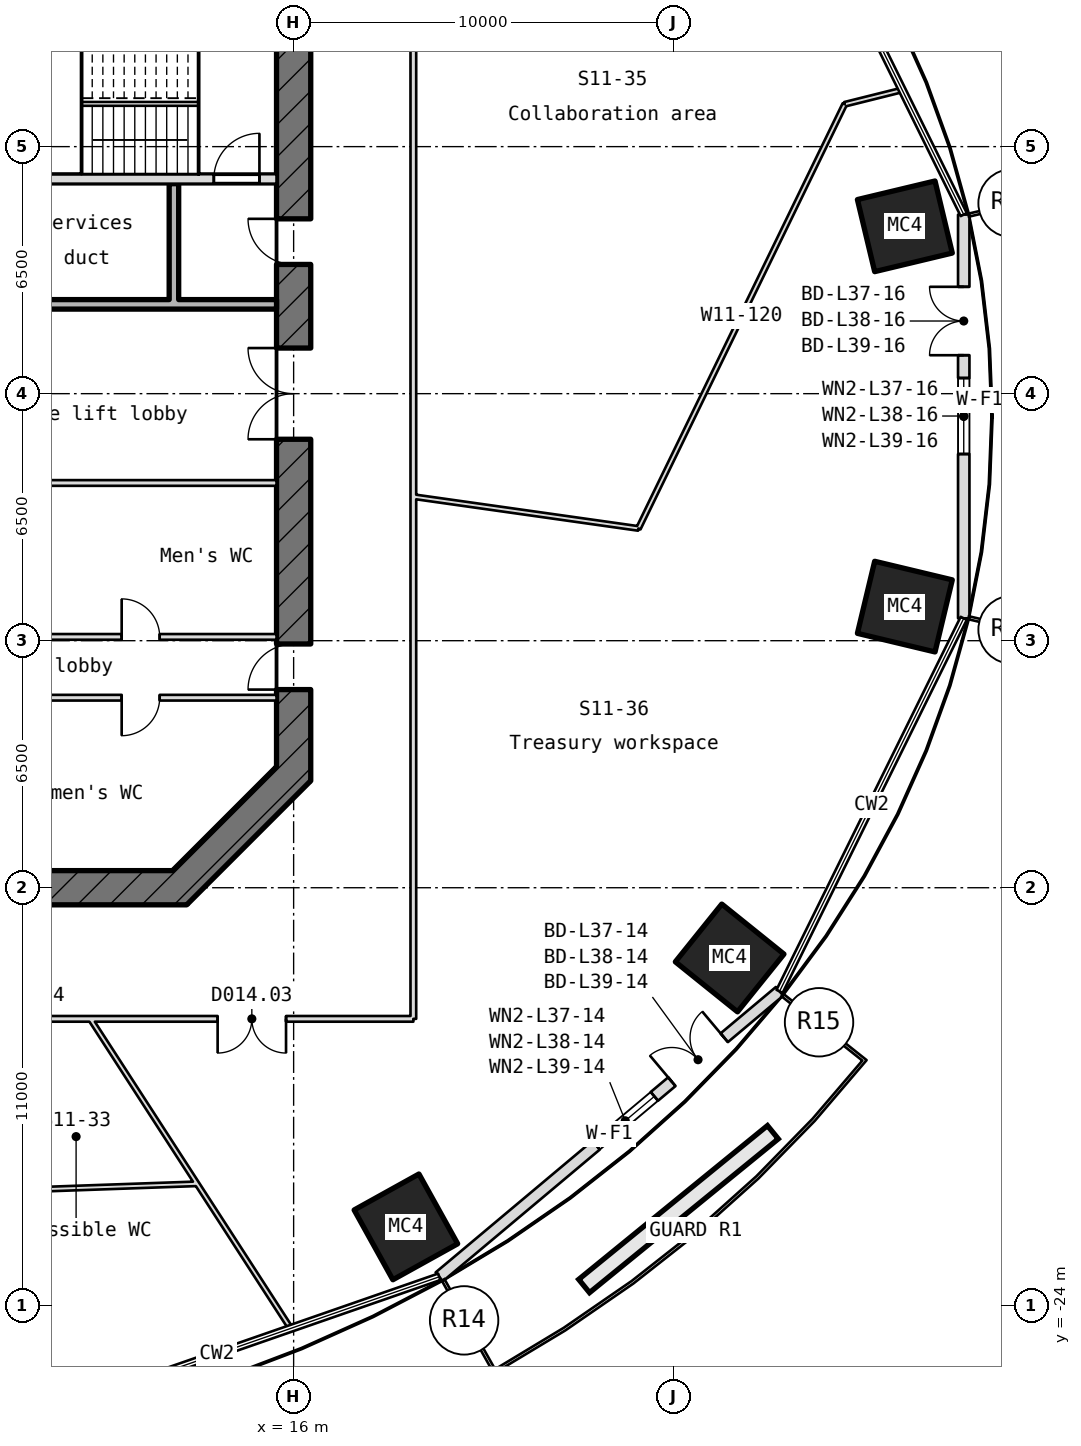
"""IFC4 building model, lengths in metres.
Left out: names, types, materials, properties, quantities, classifications, styles, units other than length and angle.
Written with IfcOpenShell. Run it as: python <this file> out.ifc"""

import sys

from ifc_helpers import new_model, si_unit, direction, frame, frame_2d, origin, origin_2d, place, context, subcontext, project, spatial, rectangle, hollow_rectangle, extrude, element, fill, save


model = new_model("IFC4")
c1 = context("Model", 3, precision=1e-05, world=origin(), true_north=direction((0.0, 1.0)))
c2 = subcontext(c1, "Body", "Model", "MODEL_VIEW")
j1 = project(units=[si_unit("LENGTHUNIT", "METRE"), si_unit("PLANEANGLEUNIT", "RADIAN")], contexts=[c1])
p1 = place(None, origin())
s1 = spatial("IfcSite", under=j1, at=p1, CompositionType="ELEMENT")
p2 = place(p1, origin())
s2 = spatial("IfcBuilding", under=s1, at=p2, CompositionType="ELEMENT")
p3 = place(p2, frame((0.0, 0.0, 173.5)))
s3 = spatial("IfcBuildingStorey", under=s2, at=p3, CompositionType="ELEMENT", Elevation=173.5)
for number, where, z_axis, x_axis in (
    (1, (32.084, 4.403, -0.18), (0.0, 0.0, 1.0), (0.233, -0.973, 0.0)),
    (2, (18.954, -21.924, -0.18), (0.0, 0.0, 1.0), (-0.874, -0.485, 0.0)),
    (3, (27.473, -14.848, -0.18), (0.0, 0.0, 1.0), (-0.627, -0.779, 0.0)),
    (4, (32.084, -5.603, -0.18), (0.0, 0.0, 1.0), (-0.233, -0.973, 0.0)),
):
    element("IfcColumn", number, at=place(p3, frame(where, z_axis=z_axis, x_axis=x_axis)), inside=s3, PredefinedType="COLUMN", context=c2, shape_type="SweptSolid", body=[
        extrude(hollow_rectangle(XDim=1.95, YDim=2.1, WallThickness=0.075, at=origin_2d()), origin(), (0.0, 0.0, 1.0), 4.15),
    ])
p4 = place(p3, frame((19.832, -23.238, 0.0), z_axis=(0.0, 0.0, 1.0), x_axis=(0.766159362154, 0.642650629645, 0.0)))
e5 = element("IfcWall", 5, at=p4, inside=s3, PredefinedType="SOLIDWALL", context=c2, shape_type="SweptSolid", body=[
    extrude(rectangle(XDim=11.688, YDim=0.3, at=frame_2d((5.844, 0.0))), origin(), (0.0, 0.0, 1.0), 3.97),
])
p5 = place(p4, frame((7.988, 0.0, 0.0)))
e6 = element("IfcOpeningElement", 6, at=p5, cuts=e5, PredefinedType="OPENING", context=c2, shape_type="SweptSolid", body=[
    extrude(rectangle(XDim=1.8, YDim=2.4, at=frame_2d((0.9, 1.2))), frame((0.0, 0.16, 0.0), z_axis=(0.0, -1.0, 0.0), x_axis=(1.0, 0.0, 0.0)), (0.0, 0.0, 1.0), 0.32),
])
p6 = place(p4, frame((5.388, 0.0, 0.9)))
e7 = element("IfcOpeningElement", 7, at=p6, cuts=e5, PredefinedType="OPENING", context=c2, shape_type="SweptSolid", body=[
    extrude(rectangle(XDim=2.0, YDim=1.5, at=frame_2d((1.0, 0.75))), frame((0.0, 0.16, 0.0), z_axis=(0.0, -1.0, 0.0), x_axis=(1.0, 0.0, 0.0)), (0.0, 0.0, 1.0), 0.32),
])
p7 = place(p3, frame((33.633, -5.912, 0.0), z_axis=(0.0, 0.0, 1.0), x_axis=(0.0, 1.0, 0.0)))
e8 = element("IfcWall", 8, at=p7, inside=s3, PredefinedType="SOLIDWALL", context=c2, shape_type="SweptSolid", body=[
    extrude(rectangle(XDim=10.623, YDim=0.3, at=frame_2d((5.312, 0.0))), origin(), (0.0, 0.0, 1.0), 3.97),
])
p8 = place(p7, frame((6.923, 0.0, 0.0)))
e9 = element("IfcOpeningElement", 9, at=p8, cuts=e8, PredefinedType="OPENING", context=c2, shape_type="SweptSolid", body=[
    extrude(rectangle(XDim=1.8, YDim=2.4, at=frame_2d((0.9, 1.2))), frame((0.0, 0.16, 0.0), z_axis=(0.0, -1.0, 0.0), x_axis=(1.0, 0.0, 0.0)), (0.0, 0.0, 1.0), 0.32),
])
p9 = place(p7, frame((4.323, 0.0, 0.9)))
e10 = element("IfcOpeningElement", 10, at=p9, cuts=e8, PredefinedType="OPENING", context=c2, shape_type="SweptSolid", body=[
    extrude(rectangle(XDim=2.0, YDim=1.5, at=frame_2d((1.0, 0.75))), frame((0.0, 0.16, 0.0), z_axis=(0.0, -1.0, 0.0), x_axis=(1.0, 0.0, 0.0)), (0.0, 0.0, 1.0), 0.32),
])
p10 = place(p3, frame((12.868, -13.132, -0.18), z_axis=(0.0, 0.0, 1.0), x_axis=(0.707106781187, 0.707106781187, 0.0)))
e11 = element("IfcWall", 11, at=p10, inside=s3, PredefinedType="SHEAR", context=c2, shape_type="SweptSolid", body=[
    extrude(rectangle(XDim=4.615, YDim=0.9, at=frame_2d((2.308, 0.0))), origin(), (0.0, 0.0, 1.0), 4.15),
])
p11 = place(p3, frame((16.0, -10.186, -0.18), z_axis=(0.0, 0.0, 1.0), x_axis=(0.0, 1.0, 0.0)))
e12 = element("IfcWall", 12, at=p11, inside=s3, PredefinedType="SHEAR", context=c2, shape_type="SweptSolid", body=[
    extrude(rectangle(XDim=20.373, YDim=0.9, at=frame_2d((10.186, 0.0))), origin(), (0.0, 0.0, 1.0), 4.15),
])
p12 = place(p11, frame((8.986, 0.0, 0.18)))
e13 = element("IfcOpeningElement", 13, at=p12, cuts=e12, PredefinedType="OPENING", context=c2, shape_type="SweptSolid", body=[
    extrude(rectangle(XDim=2.4, YDim=2.1, at=frame_2d((1.2, 1.05))), frame((0.0, 0.46, 0.0), z_axis=(0.0, -1.0, 0.0), x_axis=(1.0, 0.0, 0.0)), (0.0, 0.0, 1.0), 0.92),
])
p13 = place(p11, frame((13.586, 0.0, 0.18)))
e14 = element("IfcOpeningElement", 14, at=p13, cuts=e12, PredefinedType="OPENING", context=c2, shape_type="SweptSolid", body=[
    extrude(rectangle(XDim=1.2, YDim=2.1, at=frame_2d((0.6, 1.05))), frame((0.0, 0.46, 0.0), z_axis=(0.0, -1.0, 0.0), x_axis=(1.0, 0.0, 0.0)), (0.0, 0.0, 1.0), 0.92),
])
p14 = place(p11, frame((2.4, 0.0, 0.18)))
e15 = element("IfcOpeningElement", 15, at=p14, cuts=e12, PredefinedType="OPENING", context=c2, shape_type="SweptSolid", body=[
    extrude(rectangle(XDim=1.2, YDim=2.1, at=frame_2d((0.6, 1.05))), frame((0.0, 0.46, 0.0), z_axis=(0.0, -1.0, 0.0), x_axis=(1.0, 0.0, 0.0)), (0.0, 0.0, 1.0), 0.92),
])
p15 = place(p3, frame((-13.186, -13.0, -0.18), z_axis=(0.0, 0.0, 1.0), x_axis=(1.0, 0.0, 0.0)))
e16 = element("IfcWall", 16, at=p15, inside=s3, PredefinedType="SHEAR", context=c2, shape_type="SweptSolid", body=[
    extrude(rectangle(XDim=26.373, YDim=0.9, at=frame_2d((13.186, 0.0))), origin(), (0.0, 0.0, 1.0), 4.15),
])
p16 = place(p15, frame((2.886, 0.0, 0.18)))
e17 = element("IfcOpeningElement", 17, at=p16, cuts=e16, PredefinedType="OPENING", context=c2, shape_type="SweptSolid", body=[
    extrude(rectangle(XDim=1.2, YDim=2.1, at=frame_2d((0.6, 1.05))), frame((0.0, 0.46, 0.0), z_axis=(0.0, -1.0, 0.0), x_axis=(1.0, 0.0, 0.0)), (0.0, 0.0, 1.0), 0.92),
])
p17 = place(p15, frame((6.886, 0.0, 0.18)))
e18 = element("IfcOpeningElement", 18, at=p17, cuts=e16, PredefinedType="OPENING", context=c2, shape_type="SweptSolid", body=[
    extrude(rectangle(XDim=1.4, YDim=2.1, at=frame_2d((0.7, 1.05))), frame((0.0, 0.46, 0.0), z_axis=(0.0, -1.0, 0.0), x_axis=(1.0, 0.0, 0.0)), (0.0, 0.0, 1.0), 0.92),
])
p18 = place(p15, frame((15.486, 0.0, 0.18)))
e19 = element("IfcOpeningElement", 19, at=p18, cuts=e16, PredefinedType="OPENING", context=c2, shape_type="SweptSolid", body=[
    extrude(rectangle(XDim=1.4, YDim=2.1, at=frame_2d((0.7, 1.05))), frame((0.0, 0.46, 0.0), z_axis=(0.0, -1.0, 0.0), x_axis=(1.0, 0.0, 0.0)), (0.0, 0.0, 1.0), 0.92),
])
p19 = place(p3, frame((8.55, -8.0, 0.0), z_axis=(0.0, 0.0, 1.0), x_axis=(1.0, 0.0, 0.0)))
e20 = element("IfcWall", 20, at=p19, inside=s3, PredefinedType="PARTITIONING", context=c2, shape_type="SweptSolid", body=[
    extrude(rectangle(XDim=7.0, YDim=0.15, at=frame_2d((3.5, 0.0))), origin(), (0.0, 0.0, 1.0), 3.97),
])
p20 = place(p19, frame((2.925, 0.0, 0.0)))
e21 = element("IfcOpeningElement", 21, at=p20, cuts=e20, PredefinedType="OPENING", context=c2, shape_type="SweptSolid", body=[
    extrude(rectangle(XDim=1.0, YDim=2.1, at=frame_2d((0.5, 1.05))), frame((0.0, 0.085, 0.0), z_axis=(0.0, -1.0, 0.0), x_axis=(1.0, 0.0, 0.0)), (0.0, 0.0, 1.0), 0.17),
])
p21 = place(p3, frame((8.55, -6.4, 0.0), z_axis=(0.0, 0.0, 1.0), x_axis=(1.0, 0.0, 0.0)))
e22 = element("IfcWall", 22, at=p21, inside=s3, PredefinedType="PARTITIONING", context=c2, shape_type="SweptSolid", body=[
    extrude(rectangle(XDim=7.0, YDim=0.15, at=frame_2d((3.5, 0.0))), origin(), (0.0, 0.0, 1.0), 3.97),
])
p22 = place(p21, frame((2.925, 0.0, 0.0)))
e23 = element("IfcOpeningElement", 23, at=p22, cuts=e22, PredefinedType="OPENING", context=c2, shape_type="SweptSolid", body=[
    extrude(rectangle(XDim=1.0, YDim=2.1, at=frame_2d((0.5, 1.05))), frame((0.0, 0.085, 0.0), z_axis=(0.0, -1.0, 0.0), x_axis=(1.0, 0.0, 0.0)), (0.0, 0.0, 1.0), 0.17),
])
p23 = place(p3, frame((8.4, -2.35, 0.0), z_axis=(0.0, 0.0, 1.0), x_axis=(1.0, 0.0, 0.0)))
e24 = element("IfcWall", 24, at=p23, inside=s3, PredefinedType="PARTITIONING", context=c2, shape_type="SweptSolid", body=[
    extrude(rectangle(XDim=7.15, YDim=0.15, at=frame_2d((3.575, 0.0))), origin(), (0.0, 0.0, 1.0), 3.97),
])
p24 = place(p3, frame((8.4, 2.35, 0.0), z_axis=(0.0, 0.0, 1.0), x_axis=(1.0, 0.0, 0.0)))
e25 = element("IfcWall", 25, at=p24, inside=s3, PredefinedType="STANDARD", context=c2, shape_type="SweptSolid", body=[
    extrude(rectangle(XDim=7.15, YDim=0.25, at=frame_2d((3.575, 0.0))), origin(), (0.0, 0.0, 1.0), 3.97),
])
p25 = place(p3, frame((8.55, 5.65, -0.18), z_axis=(0.0, 0.0, 1.0), x_axis=(1.0, 0.0, 0.0)))
e26 = element("IfcWall", 26, at=p25, inside=s3, PredefinedType="SHEAR", context=c2, shape_type="SweptSolid", body=[
    extrude(rectangle(XDim=7.0, YDim=0.25, at=frame_2d((3.5, 0.0))), origin(), (0.0, 0.0, 1.0), 4.15),
])
p26 = place(p25, frame((5.35, 0.0, 0.18)))
e27 = element("IfcOpeningElement", 27, at=p26, cuts=e26, PredefinedType="OPENING", context=c2, shape_type="SweptSolid", body=[
    extrude(rectangle(XDim=1.2, YDim=2.1, at=frame_2d((0.6, 1.05))), frame((0.0, 0.135, 0.0), z_axis=(0.0, -1.0, 0.0), x_axis=(1.0, 0.0, 0.0)), (0.0, 0.0, 1.0), 0.27),
])
p27 = place(p3, frame((12.85, 2.475, 0.0), z_axis=(0.0, 0.0, 1.0), x_axis=(0.0, 1.0, 0.0)))
e28 = element("IfcWall", 28, at=p27, inside=s3, PredefinedType="STANDARD", context=c2, shape_type="SweptSolid", body=[
    extrude(rectangle(XDim=3.05, YDim=0.25, at=frame_2d((1.525, 0.0))), origin(), (0.0, 0.0, 1.0), 3.97),
])
p28 = place(p3, frame((-3.86, -21.398, 0.0), z_axis=(0.0, 0.0, 1.0), x_axis=(0.999384014625, 0.035094035277, 0.0)))
e29 = element("IfcWall", 29, at=p28, inside=s3, PredefinedType="PARTITIONING", context=c2, shape_type="SweptSolid", body=[
    extrude(rectangle(XDim=17.329, YDim=0.12, at=frame_2d((8.665, 0.0))), origin(), (0.0, 0.0, 1.0), 3.97),
])
p29 = place(p3, frame((10.649, -16.45, 0.0), z_axis=(0.0, 0.0, 1.0), x_axis=(0.5434327779, -0.839452688306, 0.0)))
e30 = element("IfcWall", 30, at=p29, inside=s3, PredefinedType="PARTITIONING", context=c2, shape_type="SweptSolid", body=[
    extrude(rectangle(XDim=9.704, YDim=0.12, at=frame_2d((4.852, 0.0))), origin(), (0.0, 0.0, 1.0), 3.97),
])
p30 = place(p3, frame((19.15, -16.45, 0.0), z_axis=(0.0, 0.0, 1.0), x_axis=(-1.0, 0.0, 0.0)))
e31 = element("IfcWall", 31, at=p30, inside=s3, PredefinedType="PARTITIONING", context=c2, shape_type="SweptSolid", body=[
    extrude(rectangle(XDim=38.3, YDim=0.15, at=frame_2d((19.15, 0.0))), origin(), (0.0, 0.0, 1.0), 3.97),
])
p31 = place(p30, frame((19.976, 0.0, 0.0)))
e32 = element("IfcOpeningElement", 32, at=p31, cuts=e31, PredefinedType="OPENING", context=c2, shape_type="SweptSolid", body=[
    extrude(rectangle(XDim=0.95, YDim=2.1, at=frame_2d((0.475, 1.05))), frame((0.0, 0.085, 0.0), z_axis=(0.0, -1.0, 0.0), x_axis=(1.0, 0.0, 0.0)), (0.0, 0.0, 1.0), 0.17),
])
p32 = place(p30, frame((16.621, 0.0, 0.0)))
e33 = element("IfcOpeningElement", 33, at=p32, cuts=e31, PredefinedType="OPENING", context=c2, shape_type="SweptSolid", body=[
    extrude(rectangle(XDim=0.95, YDim=2.1, at=frame_2d((0.475, 1.05))), frame((0.0, 0.085, 0.0), z_axis=(0.0, -1.0, 0.0), x_axis=(1.0, 0.0, 0.0)), (0.0, 0.0, 1.0), 0.17),
])
p33 = place(p30, frame((13.218, 0.0, 0.0)))
e34 = element("IfcOpeningElement", 34, at=p33, cuts=e31, PredefinedType="OPENING", context=c2, shape_type="SweptSolid", body=[
    extrude(rectangle(XDim=0.95, YDim=2.1, at=frame_2d((0.475, 1.05))), frame((0.0, 0.085, 0.0), z_axis=(0.0, -1.0, 0.0), x_axis=(1.0, 0.0, 0.0)), (0.0, 0.0, 1.0), 0.17),
])
p34 = place(p30, frame((9.765, 0.0, 0.0)))
e35 = element("IfcOpeningElement", 35, at=p34, cuts=e31, PredefinedType="OPENING", context=c2, shape_type="SweptSolid", body=[
    extrude(rectangle(XDim=0.95, YDim=2.1, at=frame_2d((0.475, 1.05))), frame((0.0, 0.085, 0.0), z_axis=(0.0, -1.0, 0.0), x_axis=(1.0, 0.0, 0.0)), (0.0, 0.0, 1.0), 0.17),
])
p35 = place(p30, frame((22.834, 0.0, 0.0)))
e36 = element("IfcOpeningElement", 36, at=p35, cuts=e31, PredefinedType="OPENING", context=c2, shape_type="SweptSolid", body=[
    extrude(rectangle(XDim=0.95, YDim=2.1, at=frame_2d((0.475, 1.05))), frame((0.0, 0.085, 0.0), z_axis=(0.0, -1.0, 0.0), x_axis=(1.0, 0.0, 0.0)), (0.0, 0.0, 1.0), 0.17),
])
p36 = place(p30, frame((3.35, 0.0, 0.0)))
e37 = element("IfcOpeningElement", 37, at=p36, cuts=e31, PredefinedType="OPENING", context=c2, shape_type="SweptSolid", body=[
    extrude(rectangle(XDim=1.8, YDim=2.1, at=frame_2d((0.9, 1.05))), frame((0.0, 0.085, 0.0), z_axis=(0.0, -1.0, 0.0), x_axis=(1.0, 0.0, 0.0)), (0.0, 0.0, 1.0), 0.17),
])
p37 = place(p3, frame((19.15, 14.955, 0.0), z_axis=(0.0, 0.0, 1.0), x_axis=(0.0, -1.0, 0.0)))
e38 = element("IfcWall", 38, at=p37, inside=s3, PredefinedType="PARTITIONING", context=c2, shape_type="SweptSolid", body=[
    extrude(rectangle(XDim=31.405, YDim=0.15, at=frame_2d((15.702, 0.0))), origin(), (0.0, 0.0, 1.0), 3.97),
])
p38 = place(p37, frame((4.612, 0.0, 0.0)))
e39 = element("IfcOpeningElement", 39, at=p38, cuts=e38, PredefinedType="OPENING", context=c2, shape_type="SweptSolid", body=[
    extrude(rectangle(XDim=0.95, YDim=2.1, at=frame_2d((0.475, 1.05))), frame((0.0, 0.085, 0.0), z_axis=(0.0, -1.0, 0.0), x_axis=(1.0, 0.0, 0.0)), (0.0, 0.0, 1.0), 0.17),
])
p39 = place(p3, frame((25.073, -3.547, 0.0), z_axis=(0.0, 0.0, 1.0), x_axis=(0.437335020704, 0.899298659882, 0.0)))
e40 = element("IfcWall", 40, at=p39, inside=s3, PredefinedType="PARTITIONING", context=c2, shape_type="SweptSolid", body=[
    extrude(rectangle(XDim=12.411, YDim=0.12, at=frame_2d((6.206, 0.0))), origin(), (0.0, 0.0, 1.0), 3.97),
])
p40 = place(p3, frame((25.073, -3.547, 0.0), z_axis=(0.0, 0.0, 1.0), x_axis=(-0.990142016785, 0.140067078917, 0.0)))
e41 = element("IfcWall", 41, at=p40, inside=s3, PredefinedType="PARTITIONING", context=c2, shape_type="SweptSolid", body=[
    extrude(rectangle(XDim=5.982, YDim=0.12, at=frame_2d((2.991, 0.0))), origin(), (0.0, 0.0, 1.0), 3.97),
])
p41 = place(p3, frame((30.501, 7.615, 0.0), z_axis=(0.0, 0.0, 1.0), x_axis=(0.970252935934, 0.242093453672, 0.0)))
e42 = element("IfcWall", 42, at=p41, inside=s3, PredefinedType="PARTITIONING", context=c2, shape_type="SweptSolid", body=[
    extrude(rectangle(XDim=1.559, YDim=0.12, at=frame_2d((0.78, 0.0))), origin(), (0.0, 0.0, 1.0), 3.97),
])
p42 = place(p5, origin())
e43 = element("IfcDoor", 43, at=p42, inside=s3, OperationType="SINGLE_SWING_LEFT", PredefinedType="DOOR", context=c2, shape_type="SweptSolid", body=[
    extrude(rectangle(XDim=1.8, YDim=2.4, at=frame_2d((0.9, 1.2))), frame((0.0, 0.025, 0.0), z_axis=(0.0, -1.0, 0.0), x_axis=(1.0, 0.0, 0.0)), (0.0, 0.0, 1.0), 0.05),
])
fill(e6, e43)
p43 = place(p6, origin())
e44 = element("IfcWindow", 44, at=p43, inside=s3, PartitioningType="SINGLE_PANEL", PredefinedType="WINDOW", context=c2, shape_type="SweptSolid", body=[
    extrude(rectangle(XDim=2.0, YDim=1.5, at=frame_2d((1.0, 0.75))), frame((0.0, 0.03, 0.0), z_axis=(0.0, -1.0, 0.0), x_axis=(1.0, 0.0, 0.0)), (0.0, 0.0, 1.0), 0.06),
])
fill(e7, e44)
p44 = place(p8, origin())
e45 = element("IfcDoor", 45, at=p44, inside=s3, OperationType="SINGLE_SWING_LEFT", PredefinedType="DOOR", context=c2, shape_type="SweptSolid", body=[
    extrude(rectangle(XDim=1.8, YDim=2.4, at=frame_2d((0.9, 1.2))), frame((0.0, 0.025, 0.0), z_axis=(0.0, -1.0, 0.0), x_axis=(1.0, 0.0, 0.0)), (0.0, 0.0, 1.0), 0.05),
])
fill(e9, e45)
p45 = place(p9, origin())
e46 = element("IfcWindow", 46, at=p45, inside=s3, PartitioningType="SINGLE_PANEL", PredefinedType="WINDOW", context=c2, shape_type="SweptSolid", body=[
    extrude(rectangle(XDim=2.0, YDim=1.5, at=frame_2d((1.0, 0.75))), frame((0.0, 0.03, 0.0), z_axis=(0.0, -1.0, 0.0), x_axis=(1.0, 0.0, 0.0)), (0.0, 0.0, 1.0), 0.06),
])
fill(e10, e46)
p46 = place(p26, origin())
e47 = element("IfcDoor", 47, at=p46, inside=s3, OperationType="SINGLE_SWING_RIGHT", PredefinedType="DOOR", context=c2, shape_type="SweptSolid", body=[
    extrude(rectangle(XDim=1.2, YDim=2.1, at=frame_2d((0.6, 1.05))), frame((0.0, 0.025, 0.0), z_axis=(0.0, -1.0, 0.0), x_axis=(1.0, 0.0, 0.0)), (0.0, 0.0, 1.0), 0.05),
])
fill(e27, e47)
p47 = place(p12, origin())
e48 = element("IfcDoor", 48, at=p47, inside=s3, OperationType="DOUBLE_DOOR_SINGLE_SWING", PredefinedType="DOOR", context=c2, shape_type="SweptSolid", body=[
    extrude(rectangle(XDim=2.4, YDim=2.1, at=frame_2d((1.2, 1.05))), frame((0.0, 0.025, 0.0), z_axis=(0.0, -1.0, 0.0), x_axis=(1.0, 0.0, 0.0)), (0.0, 0.0, 1.0), 0.05),
])
fill(e13, e48)
p48 = place(p13, origin())
e49 = element("IfcDoor", 49, at=p48, inside=s3, OperationType="SINGLE_SWING_RIGHT", PredefinedType="DOOR", context=c2, shape_type="SweptSolid", body=[
    extrude(rectangle(XDim=1.2, YDim=2.1, at=frame_2d((0.6, 1.05))), frame((0.0, 0.025, 0.0), z_axis=(0.0, -1.0, 0.0), x_axis=(1.0, 0.0, 0.0)), (0.0, 0.0, 1.0), 0.05),
])
fill(e14, e49)
p49 = place(p22, origin())
e50 = element("IfcDoor", 50, at=p49, inside=s3, OperationType="SINGLE_SWING_RIGHT", PredefinedType="DOOR", context=c2, shape_type="SweptSolid", body=[
    extrude(rectangle(XDim=1.0, YDim=2.1, at=frame_2d((0.5, 1.05))), frame((0.0, 0.025, 0.0), z_axis=(0.0, -1.0, 0.0), x_axis=(1.0, 0.0, 0.0)), (0.0, 0.0, 1.0), 0.05),
])
fill(e23, e50)
p50 = place(p14, origin())
e51 = element("IfcDoor", 51, at=p50, inside=s3, OperationType="SINGLE_SWING_RIGHT", PredefinedType="DOOR", context=c2, shape_type="SweptSolid", body=[
    extrude(rectangle(XDim=1.2, YDim=2.1, at=frame_2d((0.6, 1.05))), frame((0.0, 0.025, 0.0), z_axis=(0.0, -1.0, 0.0), x_axis=(1.0, 0.0, 0.0)), (0.0, 0.0, 1.0), 0.05),
])
fill(e15, e51)
p51 = place(p20, frame((1.0, 0.0, 0.0), z_axis=(0.0, 0.0, 1.0), x_axis=(-1.0, 0.0, 0.0)))
e52 = element("IfcDoor", 52, at=p51, inside=s3, OperationType="SINGLE_SWING_LEFT", PredefinedType="DOOR", context=c2, shape_type="SweptSolid", body=[
    extrude(rectangle(XDim=1.0, YDim=2.1, at=frame_2d((0.5, 1.05))), frame((0.0, 0.025, 0.0), z_axis=(0.0, -1.0, 0.0), x_axis=(1.0, 0.0, 0.0)), (0.0, 0.0, 1.0), 0.05),
])
fill(e21, e52)
p52 = place(p36, origin())
e53 = element("IfcDoor", 53, at=p52, inside=s3, OperationType="DOUBLE_DOOR_SINGLE_SWING", PredefinedType="DOOR", context=c2, shape_type="SweptSolid", body=[
    extrude(rectangle(XDim=1.8, YDim=2.1, at=frame_2d((0.9, 1.05))), frame((0.0, 0.025, 0.0), z_axis=(0.0, -1.0, 0.0), x_axis=(1.0, 0.0, 0.0)), (0.0, 0.0, 1.0), 0.05),
])
fill(e37, e53)
save(model, sys.argv[1])
